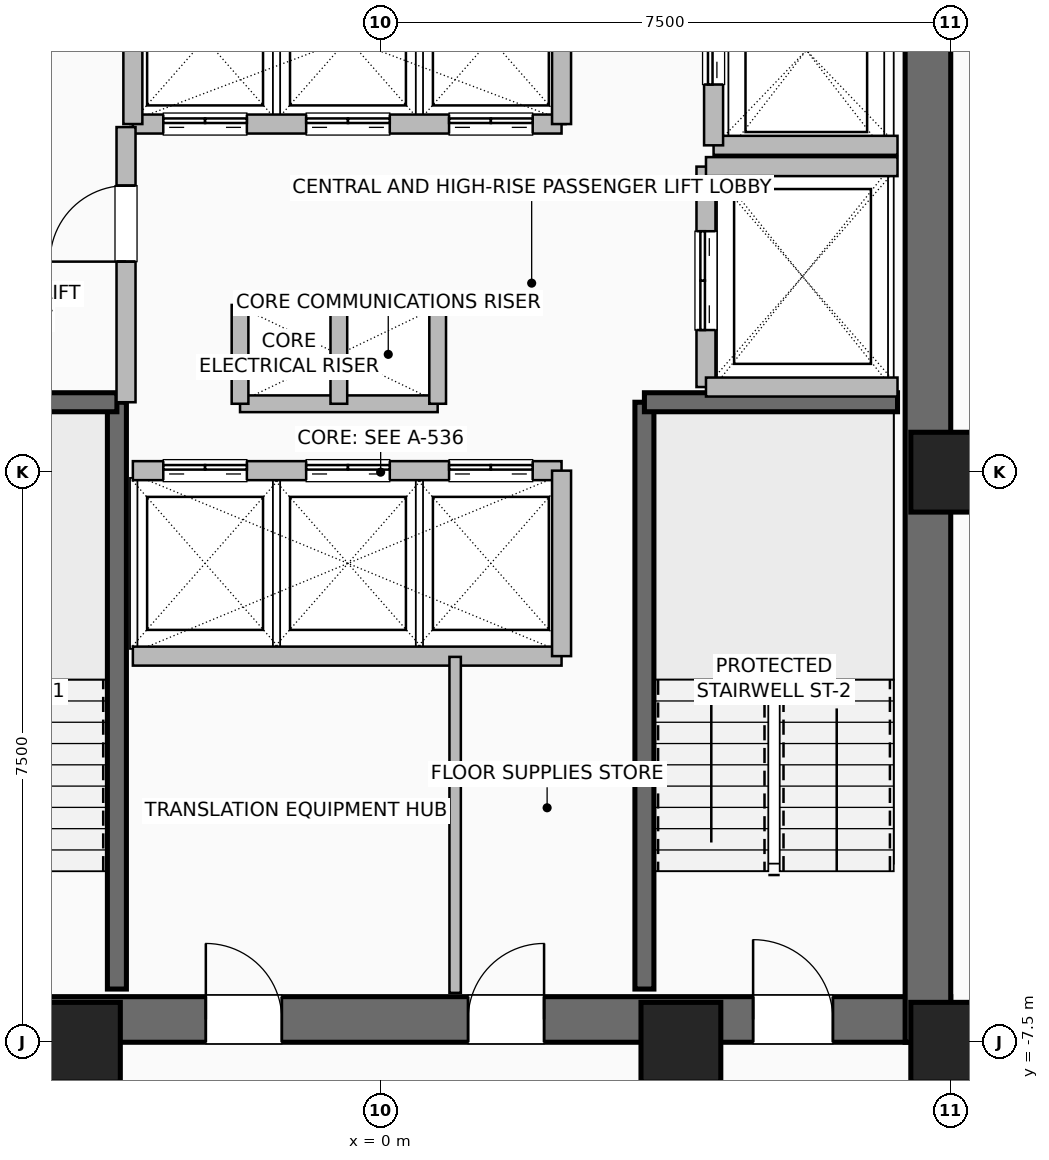
"""IFC4 building model, lengths in metres.
Left out: names, types, materials, properties, quantities, classifications, styles, units other than length and angle.
Written with IfcOpenShell. Run it as: python <this file> out.ifc"""

import sys

from ifc_helpers import new_model, si_unit, direction, frame, frame_2d, origin, origin_2d, place, context, subcontext, project, spatial, rectangle, hollow_rectangle, extrude, element, fill, save


model = new_model("IFC4")
c1 = context("Model", 3, precision=1e-05, world=origin(), true_north=direction((0.0, 1.0)))
c2 = subcontext(c1, "Body", "Model", "MODEL_VIEW")
j1 = project(units=[si_unit("LENGTHUNIT", "METRE"), si_unit("PLANEANGLEUNIT", "RADIAN")], contexts=[c1])
p1 = place(None, origin())
s1 = spatial("IfcSite", under=j1, at=p1, CompositionType="ELEMENT")
p2 = place(p1, origin())
s2 = spatial("IfcBuilding", under=s1, at=p2, CompositionType="ELEMENT")
p3 = place(p2, frame((0.0, 0.0, 137.2)))
s3 = spatial("IfcBuildingStorey", under=s2, at=p3, CompositionType="ELEMENT", Elevation=137.2)
for number, where, z_axis, x_axis in (
    (1, (-3.95, -7.5, 0.0), (0.0, 0.0, 1.0), (1.0, 0.0, 0.0)),
    (2, (3.95, -7.5, 0.0), (0.0, 0.0, 1.0), (1.0, 0.0, 0.0)),
    (3, (7.5, -7.5, 0.0), (0.0, 0.0, 1.0), (1.0, 0.0, 0.0)),
    (4, (7.5, 0.0, 0.0), (0.0, 0.0, 1.0), (1.0, 0.0, 0.0)),
):
    element("IfcColumn", number, at=place(p3, frame(where, z_axis=z_axis, x_axis=x_axis)), inside=s3, PredefinedType="COLUMN", context=c2, shape_type="SweptSolid", body=[
        extrude(hollow_rectangle(XDim=1.05, YDim=1.05, WallThickness=0.05, at=origin_2d()), origin(), (0.0, 0.0, 1.0), 3.6),
    ])
p4 = place(p3, frame((-7.5, -7.2, 0.0), z_axis=(0.0, 0.0, 1.0), x_axis=(1.0, 0.0, 0.0)))
e5 = element("IfcWall", 5, at=p4, inside=s3, PredefinedType="SHEAR", context=c2, shape_type="SweptSolid", body=[
    extrude(rectangle(XDim=15.0, YDim=0.6, at=frame_2d((7.5, 0.0))), origin(), (0.0, 0.0, 1.0), 3.36),
])
p5 = place(p4, frame((1.55, 0.0, 0.0)))
e6 = element("IfcOpeningElement", 6, at=p5, cuts=e5, PredefinedType="OPENING", context=c2, shape_type="SweptSolid", body=[
    extrude(rectangle(XDim=1.05, YDim=2.08, at=frame_2d((0.525, 1.04))), frame((0.0, 0.31, 0.0), z_axis=(0.0, -1.0, 0.0), x_axis=(1.0, 0.0, 0.0)), (0.0, 0.0, 1.0), 0.62),
])
p6 = place(p4, frame((12.4, 0.0, 0.0)))
e7 = element("IfcOpeningElement", 7, at=p6, cuts=e5, PredefinedType="OPENING", context=c2, shape_type="SweptSolid", body=[
    extrude(rectangle(XDim=1.05, YDim=2.08, at=frame_2d((0.525, 1.04))), frame((0.0, 0.31, 0.0), z_axis=(0.0, -1.0, 0.0), x_axis=(1.0, 0.0, 0.0)), (0.0, 0.0, 1.0), 0.62),
])
p7 = place(p4, frame((5.2, 0.0, 0.0)))
e8 = element("IfcOpeningElement", 8, at=p7, cuts=e5, PredefinedType="OPENING", context=c2, shape_type="SweptSolid", body=[
    extrude(rectangle(XDim=1.0, YDim=2.08, at=frame_2d((0.5, 1.04))), frame((0.0, 0.31, 0.0), z_axis=(0.0, -1.0, 0.0), x_axis=(1.0, 0.0, 0.0)), (0.0, 0.0, 1.0), 0.62),
])
p8 = place(p4, frame((8.65, 0.0, 0.0)))
e9 = element("IfcOpeningElement", 9, at=p8, cuts=e5, PredefinedType="OPENING", context=c2, shape_type="SweptSolid", body=[
    extrude(rectangle(XDim=1.0, YDim=2.08, at=frame_2d((0.5, 1.04))), frame((0.0, 0.31, 0.0), z_axis=(0.0, -1.0, 0.0), x_axis=(1.0, 0.0, 0.0)), (0.0, 0.0, 1.0), 0.62),
])
p9 = place(p3, frame((7.2, -7.5, 0.0), z_axis=(0.0, 0.0, 1.0), x_axis=(0.0, 1.0, 0.0)))
e10 = element("IfcWall", 10, at=p9, inside=s3, PredefinedType="SHEAR", context=c2, shape_type="SweptSolid", body=[
    extrude(rectangle(XDim=15.0, YDim=0.6, at=frame_2d((7.5, 0.0))), origin(), (0.0, 0.0, 1.0), 3.36),
])
p10 = place(p3, frame((-3.47, -6.8, 0.0), z_axis=(0.0, 0.0, 1.0), x_axis=(0.0, 1.0, 0.0)))
e11 = element("IfcWall", 11, at=p10, inside=s3, PredefinedType="SHEAR", context=c2, shape_type="SweptSolid", body=[
    extrude(rectangle(XDim=7.72, YDim=0.25, at=frame_2d((3.86, 0.0))), origin(), (0.0, 0.0, 1.0), 3.36),
])
p11 = place(p3, frame((-6.8, 0.92, 0.0), z_axis=(0.0, 0.0, 1.0), x_axis=(1.0, 0.0, 0.0)))
e12 = element("IfcWall", 12, at=p11, inside=s3, PredefinedType="SHEAR", context=c2, shape_type="SweptSolid", body=[
    extrude(rectangle(XDim=3.33, YDim=0.25, at=frame_2d((1.665, 0.0))), origin(), (0.0, 0.0, 1.0), 3.36),
])
p12 = place(p3, frame((3.47, -6.8, 0.0), z_axis=(0.0, 0.0, 1.0), x_axis=(0.0, 1.0, 0.0)))
e13 = element("IfcWall", 13, at=p12, inside=s3, PredefinedType="SHEAR", context=c2, shape_type="SweptSolid", body=[
    extrude(rectangle(XDim=7.72, YDim=0.25, at=frame_2d((3.86, 0.0))), origin(), (0.0, 0.0, 1.0), 3.36),
])
p13 = place(p3, frame((3.47, 0.92, 0.0), z_axis=(0.0, 0.0, 1.0), x_axis=(1.0, 0.0, 0.0)))
e14 = element("IfcWall", 14, at=p13, inside=s3, PredefinedType="SHEAR", context=c2, shape_type="SweptSolid", body=[
    extrude(rectangle(XDim=3.33, YDim=0.25, at=frame_2d((1.665, 0.0))), origin(), (0.0, 0.0, 1.0), 3.36),
])
for number, where, z_axis, x_axis in (
    (15, (-1.85, 2.2, 0.0), (0.0, 0.0, 1.0), (1.0, 0.0, 0.0)),
    (16, (-1.85, 0.9, 0.0), (0.0, 0.0, 1.0), (1.0, 0.0, 0.0)),
):
    element("IfcWall", number, at=place(p3, frame(where, z_axis=z_axis, x_axis=x_axis)), inside=s3, PredefinedType="PARTITIONING", context=c2, shape_type="SweptSolid", body=[
        extrude(rectangle(XDim=2.6, YDim=0.22, at=frame_2d((1.3, 0.0))), origin(), (0.0, 0.0, 1.0), 3.36),
    ])
for number, where, z_axis, x_axis in (
    (17, (-0.55, 0.9, 0.0), (0.0, 0.0, 1.0), (0.0, 1.0, 0.0)),
    (18, (0.75, 0.9, 0.0), (0.0, 0.0, 1.0), (0.0, 1.0, 0.0)),
    (19, (-1.85, 0.9, 0.0), (0.0, 0.0, 1.0), (0.0, 1.0, 0.0)),
):
    element("IfcWall", number, at=place(p3, frame(where, z_axis=z_axis, x_axis=x_axis)), inside=s3, PredefinedType="PARTITIONING", context=c2, shape_type="SweptSolid", body=[
        extrude(rectangle(XDim=1.3, YDim=0.22, at=frame_2d((0.65, 0.0))), origin(), (0.0, 0.0, 1.0), 3.36),
    ])
p14 = place(p3, frame((-3.26, 0.02, 0.0), z_axis=(0.0, 0.0, 1.0), x_axis=(1.0, 0.0, 0.0)))
e20 = element("IfcWall", 20, at=p14, inside=s3, PredefinedType="SHEAR", context=c2, shape_type="SweptSolid", body=[
    extrude(rectangle(XDim=5.64, YDim=0.25, at=frame_2d((2.82, 0.0))), origin(), (0.0, 0.0, 1.0), 3.36),
])
p15 = place(p14, frame((0.4, 0.0, 0.0)))
e21 = element("IfcOpeningElement", 21, at=p15, cuts=e20, PredefinedType="OPENING", context=c2, shape_type="SweptSolid", body=[
    extrude(rectangle(XDim=1.1, YDim=2.2, at=frame_2d((0.55, 1.1))), frame((0.0, 0.135, 0.0), z_axis=(0.0, -1.0, 0.0), x_axis=(1.0, 0.0, 0.0)), (0.0, 0.0, 1.0), 0.27),
])
p16 = place(p14, frame((2.28, 0.0, 0.0)))
e22 = element("IfcOpeningElement", 22, at=p16, cuts=e20, PredefinedType="OPENING", context=c2, shape_type="SweptSolid", body=[
    extrude(rectangle(XDim=1.1, YDim=2.2, at=frame_2d((0.55, 1.1))), frame((0.0, 0.135, 0.0), z_axis=(0.0, -1.0, 0.0), x_axis=(1.0, 0.0, 0.0)), (0.0, 0.0, 1.0), 0.27),
])
p17 = place(p14, frame((4.16, 0.0, 0.0)))
e23 = element("IfcOpeningElement", 23, at=p17, cuts=e20, PredefinedType="OPENING", context=c2, shape_type="SweptSolid", body=[
    extrude(rectangle(XDim=1.1, YDim=2.2, at=frame_2d((0.55, 1.1))), frame((0.0, 0.135, 0.0), z_axis=(0.0, -1.0, 0.0), x_axis=(1.0, 0.0, 0.0)), (0.0, 0.0, 1.0), 0.27),
])
p18 = place(p3, frame((-3.26, -2.42, 0.0), z_axis=(0.0, 0.0, 1.0), x_axis=(1.0, 0.0, 0.0)))
e24 = element("IfcWall", 24, at=p18, inside=s3, PredefinedType="SHEAR", context=c2, shape_type="SweptSolid", body=[
    extrude(rectangle(XDim=5.64, YDim=0.25, at=frame_2d((2.82, 0.0))), origin(), (0.0, 0.0, 1.0), 3.36),
])
p19 = place(p3, frame((2.38, -2.42, 0.0), z_axis=(0.0, 0.0, 1.0), x_axis=(0.0, 1.0, 0.0)))
e25 = element("IfcWall", 25, at=p19, inside=s3, PredefinedType="SHEAR", context=c2, shape_type="SweptSolid", body=[
    extrude(rectangle(XDim=2.44, YDim=0.25, at=frame_2d((1.22, 0.0))), origin(), (0.0, 0.0, 1.0), 3.36),
])
p20 = place(p3, frame((-3.26, 4.58, 0.0), z_axis=(0.0, 0.0, 1.0), x_axis=(1.0, 0.0, 0.0)))
e26 = element("IfcWall", 26, at=p20, inside=s3, PredefinedType="SHEAR", context=c2, shape_type="SweptSolid", body=[
    extrude(rectangle(XDim=5.64, YDim=0.25, at=frame_2d((2.82, 0.0))), origin(), (0.0, 0.0, 1.0), 3.36),
])
p21 = place(p20, frame((0.4, 0.0, 0.0)))
e27 = element("IfcOpeningElement", 27, at=p21, cuts=e26, PredefinedType="OPENING", context=c2, shape_type="SweptSolid", body=[
    extrude(rectangle(XDim=1.1, YDim=2.2, at=frame_2d((0.55, 1.1))), frame((0.0, 0.135, 0.0), z_axis=(0.0, -1.0, 0.0), x_axis=(1.0, 0.0, 0.0)), (0.0, 0.0, 1.0), 0.27),
])
p22 = place(p20, frame((2.28, 0.0, 0.0)))
e28 = element("IfcOpeningElement", 28, at=p22, cuts=e26, PredefinedType="OPENING", context=c2, shape_type="SweptSolid", body=[
    extrude(rectangle(XDim=1.1, YDim=2.2, at=frame_2d((0.55, 1.1))), frame((0.0, 0.135, 0.0), z_axis=(0.0, -1.0, 0.0), x_axis=(1.0, 0.0, 0.0)), (0.0, 0.0, 1.0), 0.27),
])
p23 = place(p20, frame((4.16, 0.0, 0.0)))
e29 = element("IfcOpeningElement", 29, at=p23, cuts=e26, PredefinedType="OPENING", context=c2, shape_type="SweptSolid", body=[
    extrude(rectangle(XDim=1.1, YDim=2.2, at=frame_2d((0.55, 1.1))), frame((0.0, 0.135, 0.0), z_axis=(0.0, -1.0, 0.0), x_axis=(1.0, 0.0, 0.0)), (0.0, 0.0, 1.0), 0.27),
])
for number, where, z_axis, x_axis in (
    (30, (-3.26, 4.58, 0.0), (0.0, 0.0, 1.0), (0.0, 1.0, 0.0)),
    (31, (2.38, 4.58, 0.0), (0.0, 0.0, 1.0), (0.0, 1.0, 0.0)),
):
    element("IfcWall", number, at=place(p3, frame(where, z_axis=z_axis, x_axis=x_axis)), inside=s3, PredefinedType="SHEAR", context=c2, shape_type="SweptSolid", body=[
        extrude(rectangle(XDim=2.22, YDim=0.25, at=frame_2d((1.11, 0.0))), origin(), (0.0, 0.0, 1.0), 3.36),
    ])
p24 = place(p3, frame((4.38, 4.3, 0.0), z_axis=(0.0, 0.0, 1.0), x_axis=(1.0, 0.0, 0.0)))
e32 = element("IfcWall", 32, at=p24, inside=s3, PredefinedType="SHEAR", context=c2, shape_type="SweptSolid", body=[
    extrude(rectangle(XDim=2.42, YDim=0.25, at=frame_2d((1.21, 0.0))), origin(), (0.0, 0.0, 1.0), 3.36),
])
p25 = place(p3, frame((4.38, 4.3, 0.0), z_axis=(0.0, 0.0, 1.0), x_axis=(0.0, 1.0, 0.0)))
e33 = element("IfcWall", 33, at=p25, inside=s3, PredefinedType="SHEAR", context=c2, shape_type="SweptSolid", body=[
    extrude(rectangle(XDim=2.5, YDim=0.25, at=frame_2d((1.25, 0.0))), origin(), (0.0, 0.0, 1.0), 3.36),
])
p26 = place(p25, frame((0.8, 0.0, 0.0)))
e34 = element("IfcOpeningElement", 34, at=p26, cuts=e33, PredefinedType="OPENING", context=c2, shape_type="SweptSolid", body=[
    extrude(rectangle(XDim=1.2, YDim=2.2, at=frame_2d((0.6, 1.1))), frame((0.0, 0.135, 0.0), z_axis=(0.0, -1.0, 0.0), x_axis=(1.0, 0.0, 0.0)), (0.0, 0.0, 1.0), 0.27),
])
p27 = place(p3, frame((4.28, 1.12, 0.0), z_axis=(0.0, 0.0, 1.0), x_axis=(0.0, 1.0, 0.0)))
e35 = element("IfcWall", 35, at=p27, inside=s3, PredefinedType="SHEAR", context=c2, shape_type="SweptSolid", body=[
    extrude(rectangle(XDim=2.9, YDim=0.25, at=frame_2d((1.45, 0.0))), origin(), (0.0, 0.0, 1.0), 3.36),
])
p28 = place(p27, frame((0.75, 0.0, 0.0)))
e36 = element("IfcOpeningElement", 36, at=p28, cuts=e35, PredefinedType="OPENING", context=c2, shape_type="SweptSolid", body=[
    extrude(rectangle(XDim=1.3, YDim=2.3, at=frame_2d((0.65, 1.15))), frame((0.0, 0.135, 0.0), z_axis=(0.0, -1.0, 0.0), x_axis=(1.0, 0.0, 0.0)), (0.0, 0.0, 1.0), 0.27),
])
for number, where, z_axis, x_axis in (
    (37, (4.28, 1.12, 0.0), (0.0, 0.0, 1.0), (1.0, 0.0, 0.0)),
    (38, (4.28, 4.02, 0.0), (0.0, 0.0, 1.0), (1.0, 0.0, 0.0)),
):
    element("IfcWall", number, at=place(p3, frame(where, z_axis=z_axis, x_axis=x_axis)), inside=s3, PredefinedType="SHEAR", context=c2, shape_type="SweptSolid", body=[
        extrude(rectangle(XDim=2.52, YDim=0.25, at=frame_2d((1.26, 0.0))), origin(), (0.0, 0.0, 1.0), 3.36),
    ])
p29 = place(p3, frame((-3.35, 0.92, 0.0), z_axis=(0.0, 0.0, 1.0), x_axis=(0.0, 1.0, 0.0)))
e39 = element("IfcWall", 39, at=p29, inside=s3, PredefinedType="SHEAR", context=c2, shape_type="SweptSolid", body=[
    extrude(rectangle(XDim=3.62, YDim=0.25, at=frame_2d((1.81, 0.0))), origin(), (0.0, 0.0, 1.0), 3.36),
])
p30 = place(p29, frame((1.85, 0.0, 0.0)))
e40 = element("IfcOpeningElement", 40, at=p30, cuts=e39, PredefinedType="OPENING", context=c2, shape_type="SweptSolid", body=[
    extrude(rectangle(XDim=1.0, YDim=2.08, at=frame_2d((0.5, 1.04))), frame((0.0, 0.135, 0.0), z_axis=(0.0, -1.0, 0.0), x_axis=(1.0, 0.0, 0.0)), (0.0, 0.0, 1.0), 0.27),
])
p31 = place(p3, frame((0.98, -6.85, 0.0), z_axis=(0.0, 0.0, 1.0), x_axis=(0.0, 1.0, 0.0)))
e41 = element("IfcWall", 41, at=p31, inside=s3, PredefinedType="PARTITIONING", context=c2, shape_type="SweptSolid", body=[
    extrude(rectangle(XDim=4.42, YDim=0.15, at=frame_2d((2.21, 0.0))), origin(), (0.0, 0.0, 1.0), 3.36),
])
p32 = place(p3, frame((7.45, -7.48, 0.0), z_axis=(0.0, 0.0, 1.0), x_axis=(1.0, 0.0, 0.0)))
e42 = element("IfcWall", 42, at=p32, inside=s3, PredefinedType="PARTITIONING", context=c2, shape_type="SweptSolid", body=[
    extrude(rectangle(XDim=0.95, YDim=0.15, at=frame_2d((0.475, 0.0))), origin(), (0.0, 0.0, 1.0), 3.36),
])
p33 = place(p6, origin())
e43 = element("IfcDoor", 43, at=p33, inside=s3, OperationType="SINGLE_SWING_LEFT", PredefinedType="DOOR", context=c2, shape_type="SweptSolid", body=[
    extrude(rectangle(XDim=1.05, YDim=2.08, at=frame_2d((0.525, 1.04))), frame((0.0, 0.025, 0.0), z_axis=(0.0, -1.0, 0.0), x_axis=(1.0, 0.0, 0.0)), (0.0, 0.0, 1.0), 0.05),
])
fill(e7, e43)
p34 = place(p7, origin())
e44 = element("IfcDoor", 44, at=p34, inside=s3, OperationType="SINGLE_SWING_LEFT", PredefinedType="DOOR", context=c2, shape_type="SweptSolid", body=[
    extrude(rectangle(XDim=1.0, YDim=2.08, at=frame_2d((0.5, 1.04))), frame((0.0, 0.025, 0.0), z_axis=(0.0, -1.0, 0.0), x_axis=(1.0, 0.0, 0.0)), (0.0, 0.0, 1.0), 0.05),
])
fill(e8, e44)
p35 = place(p8, origin())
e45 = element("IfcDoor", 45, at=p35, inside=s3, OperationType="SINGLE_SWING_RIGHT", PredefinedType="DOOR", context=c2, shape_type="SweptSolid", body=[
    extrude(rectangle(XDim=1.0, YDim=2.08, at=frame_2d((0.5, 1.04))), frame((0.0, 0.025, 0.0), z_axis=(0.0, -1.0, 0.0), x_axis=(1.0, 0.0, 0.0)), (0.0, 0.0, 1.0), 0.05),
])
fill(e9, e45)
p36 = place(p15, origin())
e46 = element("IfcDoor", 46, at=p36, inside=s3, OperationType="DOUBLE_DOOR_SLIDING", PredefinedType="DOOR", context=c2, shape_type="SweptSolid", body=[
    extrude(rectangle(XDim=1.1, YDim=2.2, at=frame_2d((0.55, 1.1))), frame((0.0, 0.025, 0.0), z_axis=(0.0, -1.0, 0.0), x_axis=(1.0, 0.0, 0.0)), (0.0, 0.0, 1.0), 0.05),
])
fill(e21, e46)
p37 = place(p16, origin())
e47 = element("IfcDoor", 47, at=p37, inside=s3, OperationType="DOUBLE_DOOR_SLIDING", PredefinedType="DOOR", context=c2, shape_type="SweptSolid", body=[
    extrude(rectangle(XDim=1.1, YDim=2.2, at=frame_2d((0.55, 1.1))), frame((0.0, 0.025, 0.0), z_axis=(0.0, -1.0, 0.0), x_axis=(1.0, 0.0, 0.0)), (0.0, 0.0, 1.0), 0.05),
])
fill(e22, e47)
p38 = place(p17, origin())
e48 = element("IfcDoor", 48, at=p38, inside=s3, OperationType="DOUBLE_DOOR_SLIDING", PredefinedType="DOOR", context=c2, shape_type="SweptSolid", body=[
    extrude(rectangle(XDim=1.1, YDim=2.2, at=frame_2d((0.55, 1.1))), frame((0.0, 0.025, 0.0), z_axis=(0.0, -1.0, 0.0), x_axis=(1.0, 0.0, 0.0)), (0.0, 0.0, 1.0), 0.05),
])
fill(e23, e48)
p39 = place(p21, origin())
e49 = element("IfcDoor", 49, at=p39, inside=s3, OperationType="DOUBLE_DOOR_SLIDING", PredefinedType="DOOR", context=c2, shape_type="SweptSolid", body=[
    extrude(rectangle(XDim=1.1, YDim=2.2, at=frame_2d((0.55, 1.1))), frame((0.0, 0.025, 0.0), z_axis=(0.0, -1.0, 0.0), x_axis=(1.0, 0.0, 0.0)), (0.0, 0.0, 1.0), 0.05),
])
fill(e27, e49)
p40 = place(p22, origin())
e50 = element("IfcDoor", 50, at=p40, inside=s3, OperationType="DOUBLE_DOOR_SLIDING", PredefinedType="DOOR", context=c2, shape_type="SweptSolid", body=[
    extrude(rectangle(XDim=1.1, YDim=2.2, at=frame_2d((0.55, 1.1))), frame((0.0, 0.025, 0.0), z_axis=(0.0, -1.0, 0.0), x_axis=(1.0, 0.0, 0.0)), (0.0, 0.0, 1.0), 0.05),
])
fill(e28, e50)
p41 = place(p23, origin())
e51 = element("IfcDoor", 51, at=p41, inside=s3, OperationType="DOUBLE_DOOR_SLIDING", PredefinedType="DOOR", context=c2, shape_type="SweptSolid", body=[
    extrude(rectangle(XDim=1.1, YDim=2.2, at=frame_2d((0.55, 1.1))), frame((0.0, 0.025, 0.0), z_axis=(0.0, -1.0, 0.0), x_axis=(1.0, 0.0, 0.0)), (0.0, 0.0, 1.0), 0.05),
])
fill(e29, e51)
p42 = place(p26, origin())
e52 = element("IfcDoor", 52, at=p42, inside=s3, OperationType="DOUBLE_DOOR_SLIDING", PredefinedType="DOOR", context=c2, shape_type="SweptSolid", body=[
    extrude(rectangle(XDim=1.2, YDim=2.2, at=frame_2d((0.6, 1.1))), frame((0.0, 0.025, 0.0), z_axis=(0.0, -1.0, 0.0), x_axis=(1.0, 0.0, 0.0)), (0.0, 0.0, 1.0), 0.05),
])
fill(e34, e52)
p43 = place(p28, origin())
e53 = element("IfcDoor", 53, at=p43, inside=s3, OperationType="DOUBLE_DOOR_SLIDING", PredefinedType="DOOR", context=c2, shape_type="SweptSolid", body=[
    extrude(rectangle(XDim=1.3, YDim=2.3, at=frame_2d((0.65, 1.15))), frame((0.0, 0.025, 0.0), z_axis=(0.0, -1.0, 0.0), x_axis=(1.0, 0.0, 0.0)), (0.0, 0.0, 1.0), 0.05),
])
fill(e36, e53)
p44 = place(p30, origin())
e54 = element("IfcDoor", 54, at=p44, inside=s3, OperationType="SINGLE_SWING_LEFT", PredefinedType="DOOR", context=c2, shape_type="SweptSolid", body=[
    extrude(rectangle(XDim=1.0, YDim=2.08, at=frame_2d((0.5, 1.04))), frame((0.0, 0.025, 0.0), z_axis=(0.0, -1.0, 0.0), x_axis=(1.0, 0.0, 0.0)), (0.0, 0.0, 1.0), 0.05),
])
fill(e40, e54)
save(model, sys.argv[1])
